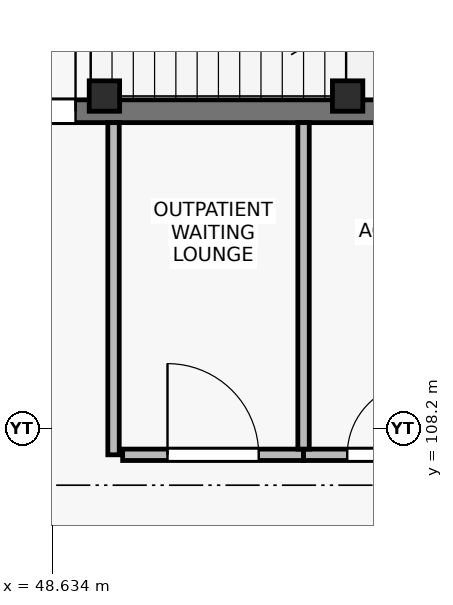
"""IFC4 building model, lengths in metres.
Left out: names, types, materials, properties, quantities, classifications, styles, units other than length and angle.
Written with IfcOpenShell. Run it as: python <this file> out.ifc"""

import sys

from ifc_helpers import new_model, si_unit, direction, frame, frame_2d, origin, origin_2d, place, context, subcontext, project, spatial, rectangle, extrude, element, fill, save


model = new_model("IFC4")
c1 = context("Model", 3, precision=1e-05, world=origin(), true_north=direction((0.0, 1.0)))
c2 = subcontext(c1, "Body", "Model", "MODEL_VIEW")
j1 = project(units=[si_unit("LENGTHUNIT", "METRE"), si_unit("PLANEANGLEUNIT", "RADIAN")], contexts=[c1])
p1 = place(None, origin())
s1 = spatial("IfcSite", under=j1, at=p1, CompositionType="ELEMENT")
p2 = place(p1, origin())
s2 = spatial("IfcBuilding", under=s1, at=p2, CompositionType="ELEMENT")
p3 = place(p2, frame((0.0, 0.0, 14.1)))
s3 = spatial("IfcBuildingStorey", under=s2, at=p3, CompositionType="ELEMENT", Elevation=14.1)
for number, where, z_axis, x_axis in (
    (1, (49.32, 112.57, 0.0), (0.0, 0.0, 1.0), (1.0, 0.0, 0.0)),
    (2, (52.52, 112.57, 0.0), (0.0, 0.0, 1.0), (1.0, 0.0, 0.0)),
):
    element("IfcColumn", number, at=place(p3, frame(where, z_axis=z_axis, x_axis=x_axis)), inside=s3, PredefinedType="COLUMN", context=c2, shape_type="SweptSolid", body=[
        extrude(rectangle(XDim=0.4, YDim=0.4, at=origin_2d()), origin(), (0.0, 0.0, 1.0), 4.5),
    ])
p4 = place(p3, frame((46.95, 112.37, 0.0), z_axis=(0.0, 0.0, 1.0), x_axis=(1.0, 0.0, 0.0)))
e3 = element("IfcWall", 3, at=p4, inside=s3, PredefinedType="SHEAR", context=c2, shape_type="SweptSolid", body=[
    extrude(rectangle(XDim=7.59, YDim=0.3, at=frame_2d((3.795, 0.0))), origin(), (0.0, 0.0, 1.0), 4.26),
])
p5 = place(p4, frame((0.59, 0.0, 0.0)))
e4 = element("IfcOpeningElement", 4, at=p5, cuts=e3, PredefinedType="OPENING", context=c2, shape_type="SweptSolid", body=[
    extrude(rectangle(XDim=1.4, YDim=2.2, at=frame_2d((0.7, 1.1))), frame((0.0, 0.16, 0.0), z_axis=(0.0, -1.0, 0.0), x_axis=(1.0, 0.0, 0.0)), (0.0, 0.0, 1.0), 0.32),
])
p6 = place(p3, frame((49.44, 107.85, 0.0), z_axis=(0.0, 0.0, 1.0), x_axis=(0.0, 1.0, 0.0)))
e5 = element("IfcWall", 5, at=p6, inside=s3, PredefinedType="PARTITIONING", context=c2, shape_type="SweptSolid", body=[
    extrude(rectangle(XDim=4.37, YDim=0.15, at=frame_2d((2.185, 0.0))), origin(), (0.0, 0.0, 1.0), 4.26),
])
p7 = place(p3, frame((49.56, 107.85, 0.0), z_axis=(0.0, 0.0, 1.0), x_axis=(1.0, 0.0, 0.0)))
e6 = element("IfcWall", 6, at=p7, inside=s3, PredefinedType="PARTITIONING", context=c2, shape_type="SweptSolid", body=[
    extrude(rectangle(XDim=2.38, YDim=0.15, at=frame_2d((1.19, 0.0))), origin(), (0.0, 0.0, 1.0), 3.72),
])
p8 = place(p7, frame((0.59, 0.0, 0.0)))
e7 = element("IfcOpeningElement", 7, at=p8, cuts=e6, PredefinedType="OPENING", context=c2, shape_type="SweptSolid", body=[
    extrude(rectangle(XDim=1.2, YDim=2.2, at=frame_2d((0.6, 1.1))), frame((0.0, 0.085, 0.0), z_axis=(0.0, -1.0, 0.0), x_axis=(1.0, 0.0, 0.0)), (0.0, 0.0, 1.0), 0.17),
])
p9 = place(p3, frame((51.94, 107.85, 0.0), z_axis=(0.0, 0.0, 1.0), x_axis=(1.0, 0.0, 0.0)))
e8 = element("IfcWall", 8, at=p9, inside=s3, PredefinedType="PARTITIONING", context=c2, shape_type="SweptSolid", body=[
    extrude(rectangle(XDim=3.01, YDim=0.15, at=frame_2d((1.505, 0.0))), origin(), (0.0, 0.0, 1.0), 3.72),
])
p10 = place(p9, frame((0.575, 0.0, 0.0)))
e9 = element("IfcOpeningElement", 9, at=p10, cuts=e8, PredefinedType="OPENING", context=c2, shape_type="SweptSolid", body=[
    extrude(rectangle(XDim=0.95, YDim=2.1, at=frame_2d((0.475, 1.05))), frame((0.0, 0.085, 0.0), z_axis=(0.0, -1.0, 0.0), x_axis=(1.0, 0.0, 0.0)), (0.0, 0.0, 1.0), 0.17),
])
p11 = place(p3, frame((51.94, 107.925, 0.0), z_axis=(0.0, 0.0, 1.0), x_axis=(0.0, 1.0, 0.0)))
e10 = element("IfcWall", 10, at=p11, inside=s3, PredefinedType="PARTITIONING", context=c2, shape_type="SweptSolid", body=[
    extrude(rectangle(XDim=4.295, YDim=0.15, at=frame_2d((2.147, 0.0))), origin(), (0.0, 0.0, 1.0), 4.26),
])
p12 = place(p5, origin())
e11 = element("IfcDoor", 11, at=p12, inside=s3, OperationType="SINGLE_SWING_RIGHT", PredefinedType="DOOR", context=c2, shape_type="SweptSolid", body=[
    extrude(rectangle(XDim=1.4, YDim=2.2, at=frame_2d((0.7, 1.1))), frame((0.0, 0.025, 0.0), z_axis=(0.0, -1.0, 0.0), x_axis=(1.0, 0.0, 0.0)), (0.0, 0.0, 1.0), 0.05),
])
fill(e4, e11)
p13 = place(p8, origin())
e12 = element("IfcDoor", 12, at=p13, inside=s3, OperationType="SINGLE_SWING_LEFT", PredefinedType="DOOR", context=c2, shape_type="SweptSolid", body=[
    extrude(rectangle(XDim=1.2, YDim=2.2, at=frame_2d((0.6, 1.1))), frame((0.0, 0.025, 0.0), z_axis=(0.0, -1.0, 0.0), x_axis=(1.0, 0.0, 0.0)), (0.0, 0.0, 1.0), 0.05),
])
fill(e7, e12)
p14 = place(p10, origin())
e13 = element("IfcDoor", 13, at=p14, inside=s3, OperationType="SINGLE_SWING_RIGHT", PredefinedType="DOOR", context=c2, shape_type="SweptSolid", body=[
    extrude(rectangle(XDim=0.95, YDim=2.1, at=frame_2d((0.475, 1.05))), frame((0.0, 0.025, 0.0), z_axis=(0.0, -1.0, 0.0), x_axis=(1.0, 0.0, 0.0)), (0.0, 0.0, 1.0), 0.05),
])
fill(e9, e13)
save(model, sys.argv[1])
